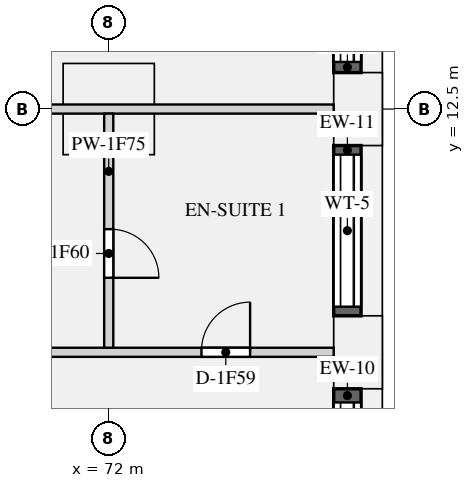
"""IFC4 building model, lengths in metres.
Left out: names, types, materials, properties, quantities, classifications, styles, units other than length and angle.
Written with IfcOpenShell. Run it as: python <this file> out.ifc"""

import sys

from ifc_helpers import new_model, si_unit, direction, frame, frame_2d, origin, origin_2d, place, context, subcontext, project, spatial, rectangle, extrude, element, fill, save


model = new_model("IFC4")
c1 = context("Model", 3, precision=1e-05, world=origin(), true_north=direction((0.0, 1.0)))
c2 = subcontext(c1, "Body", "Model", "MODEL_VIEW")
j1 = project(units=[si_unit("LENGTHUNIT", "METRE"), si_unit("PLANEANGLEUNIT", "RADIAN")], contexts=[c1])
p1 = place(None, origin())
s1 = spatial("IfcSite", under=j1, at=p1, CompositionType="ELEMENT")
p2 = place(p1, origin())
s2 = spatial("IfcBuilding", under=s1, at=p2, CompositionType="ELEMENT")
p3 = place(p2, frame((0.0, 0.0, 60.45)))
s3 = spatial("IfcBuildingStorey", under=s2, at=p3, CompositionType="ELEMENT", Elevation=60.45)
for number, where, z_axis, x_axis in (
    (1, (76.1, 8.5, 0.0), (0.0, 0.0, 1.0), (0.0, 1.0, 0.0)),
    (2, (76.1, 12.5, 0.0), (0.0, 0.0, 1.0), (0.0, 1.0, 0.0)),
):
    element("IfcColumn", number, at=place(p3, frame(where, z_axis=z_axis, x_axis=x_axis)), inside=s3, PredefinedType="USERDEFINED", context=c2, shape_type="SweptSolid", body=[
        extrude(rectangle(XDim=1.2, YDim=0.8, at=origin_2d()), origin(), (0.0, 0.0, 1.0), 3.15),
    ])
p4 = place(p3, frame((72.0, 12.5, 0.0), z_axis=(0.0, 0.0, 1.0), x_axis=(1.0, 0.0, 0.0)))
e3 = element("IfcColumn", 3, at=p4, inside=s3, PredefinedType="COLUMN", context=c2, shape_type="SweptSolid", body=[
    extrude(rectangle(XDim=1.5, YDim=1.5, at=origin_2d()), origin(), (0.0, 0.0, 1.0), 3.15),
])
p5 = place(p3, frame((75.925, 5.7, 0.9), z_axis=(0.0, 0.0, 1.0), x_axis=(0.0, 1.0, 0.0)))
e4 = element("IfcWall", 4, at=p5, inside=s3, PredefinedType="SOLIDWALL", context=c2, shape_type="SweptSolid", body=[
    extrude(rectangle(XDim=2.2, YDim=0.45, at=frame_2d((1.1, 0.0))), origin(), (0.0, 0.0, 1.0), 1.93),
])
p6 = place(p5, frame((0.225, 0.0, 0.15)))
e5 = element("IfcOpeningElement", 5, at=p6, cuts=e4, PredefinedType="OPENING", context=c2, shape_type="SweptSolid", body=[
    extrude(rectangle(XDim=1.75, YDim=1.5, at=frame_2d((0.875, 0.75))), frame((0.0, 0.235, 0.0), z_axis=(0.0, -1.0, 0.0), x_axis=(1.0, 0.0, 0.0)), (0.0, 0.0, 1.0), 0.47),
])
p7 = place(p3, frame((75.925, 9.1, 0.9), z_axis=(0.0, 0.0, 1.0), x_axis=(0.0, 1.0, 0.0)))
e6 = element("IfcWall", 6, at=p7, inside=s3, PredefinedType="SOLIDWALL", context=c2, shape_type="SweptSolid", body=[
    extrude(rectangle(XDim=2.8, YDim=0.45, at=frame_2d((1.4, 0.0))), origin(), (0.0, 0.0, 1.0), 1.93),
])
p8 = place(p7, frame((0.15, 0.0, 0.15)))
e7 = element("IfcOpeningElement", 7, at=p8, cuts=e6, PredefinedType="OPENING", context=c2, shape_type="SweptSolid", body=[
    extrude(rectangle(XDim=2.5, YDim=1.5, at=frame_2d((1.25, 0.75))), frame((0.0, 0.235, 0.0), z_axis=(0.0, -1.0, 0.0), x_axis=(1.0, 0.0, 0.0)), (0.0, 0.0, 1.0), 0.47),
])
p9 = place(p3, frame((75.925, 13.1, 0.9), z_axis=(0.0, 0.0, 1.0), x_axis=(0.0, 1.0, 0.0)))
e8 = element("IfcWall", 8, at=p9, inside=s3, PredefinedType="SOLIDWALL", context=c2, shape_type="SweptSolid", body=[
    extrude(rectangle(XDim=2.6, YDim=0.45, at=frame_2d((1.3, 0.0))), origin(), (0.0, 0.0, 1.0), 1.93),
])
p10 = place(p9, frame((0.175, 0.0, 0.15)))
e9 = element("IfcOpeningElement", 9, at=p10, cuts=e8, PredefinedType="OPENING", context=c2, shape_type="SweptSolid", body=[
    extrude(rectangle(XDim=2.25, YDim=1.5, at=frame_2d((1.125, 0.75))), frame((0.0, 0.235, 0.0), z_axis=(0.0, -1.0, 0.0), x_axis=(1.0, 0.0, 0.0)), (0.0, 0.0, 1.0), 0.47),
])
p11 = place(p3, frame((54.0, 8.5, 0.0), z_axis=(0.0, 0.0, 1.0), x_axis=(1.0, 0.0, 0.0)))
e10 = element("IfcWall", 10, at=p11, inside=s3, PredefinedType="PARTITIONING", context=c2, shape_type="SweptSolid", body=[
    extrude(rectangle(XDim=21.7, YDim=0.15, at=frame_2d((10.85, 0.0))), origin(), (0.0, 0.0, 1.0), 2.83),
])
p12 = place(p11, frame((1.8, 0.0, 0.0)))
e11 = element("IfcOpeningElement", 11, at=p12, cuts=e10, PredefinedType="OPENING", context=c2, shape_type="SweptSolid", body=[
    extrude(rectangle(XDim=0.9, YDim=2.1, at=frame_2d((0.45, 1.05))), frame((0.0, 0.085, 0.0), z_axis=(0.0, -1.0, 0.0), x_axis=(1.0, 0.0, 0.0)), (0.0, 0.0, 1.0), 0.17),
])
p13 = place(p11, frame((6.3, 0.0, 0.0)))
e12 = element("IfcOpeningElement", 12, at=p13, cuts=e10, PredefinedType="OPENING", context=c2, shape_type="SweptSolid", body=[
    extrude(rectangle(XDim=0.9, YDim=2.1, at=frame_2d((0.45, 1.05))), frame((0.0, 0.085, 0.0), z_axis=(0.0, -1.0, 0.0), x_axis=(1.0, 0.0, 0.0)), (0.0, 0.0, 1.0), 0.17),
])
p14 = place(p11, frame((10.8, 0.0, 0.0)))
e13 = element("IfcOpeningElement", 13, at=p14, cuts=e10, PredefinedType="OPENING", context=c2, shape_type="SweptSolid", body=[
    extrude(rectangle(XDim=0.9, YDim=2.1, at=frame_2d((0.45, 1.05))), frame((0.0, 0.085, 0.0), z_axis=(0.0, -1.0, 0.0), x_axis=(1.0, 0.0, 0.0)), (0.0, 0.0, 1.0), 0.17),
])
p15 = place(p11, frame((19.525, 0.0, 0.0)))
e14 = element("IfcOpeningElement", 14, at=p15, cuts=e10, PredefinedType="OPENING", context=c2, shape_type="SweptSolid", body=[
    extrude(rectangle(XDim=0.8, YDim=2.1, at=frame_2d((0.4, 1.05))), frame((0.0, 0.085, 0.0), z_axis=(0.0, -1.0, 0.0), x_axis=(1.0, 0.0, 0.0)), (0.0, 0.0, 1.0), 0.17),
])
p16 = place(p11, frame((15.35, 0.0, 0.0)))
e15 = element("IfcOpeningElement", 15, at=p16, cuts=e10, PredefinedType="OPENING", context=c2, shape_type="SweptSolid", body=[
    extrude(rectangle(XDim=0.8, YDim=2.1, at=frame_2d((0.4, 1.05))), frame((0.0, 0.085, 0.0), z_axis=(0.0, -1.0, 0.0), x_axis=(1.0, 0.0, 0.0)), (0.0, 0.0, 1.0), 0.17),
])
p17 = place(p3, frame((58.425, 12.5, 0.0), z_axis=(0.0, 0.0, 1.0), x_axis=(1.0, 0.0, 0.0)))
e16 = element("IfcWall", 16, at=p17, inside=s3, PredefinedType="PARTITIONING", context=c2, shape_type="SweptSolid", body=[
    extrude(rectangle(XDim=17.275, YDim=0.15, at=frame_2d((8.637, 0.0))), origin(), (0.0, 0.0, 1.0), 2.83),
])
p18 = place(p3, frame((72.0, 8.575, 0.0), z_axis=(0.0, 0.0, 1.0), x_axis=(0.0, 1.0, 0.0)))
e17 = element("IfcWall", 17, at=p18, inside=s3, PredefinedType="PARTITIONING", context=c2, shape_type="SweptSolid", body=[
    extrude(rectangle(XDim=3.85, YDim=0.15, at=frame_2d((1.925, 0.0))), origin(), (0.0, 0.0, 1.0), 2.83),
])
p19 = place(p18, frame((1.15, 0.0, 0.0)))
e18 = element("IfcOpeningElement", 18, at=p19, cuts=e17, PredefinedType="OPENING", context=c2, shape_type="SweptSolid", body=[
    extrude(rectangle(XDim=0.8, YDim=2.1, at=frame_2d((0.4, 1.05))), frame((0.0, 0.085, 0.0), z_axis=(0.0, -1.0, 0.0), x_axis=(1.0, 0.0, 0.0)), (0.0, 0.0, 1.0), 0.17),
])
p20 = place(p6, origin())
e19 = element("IfcWindow", 19, at=p20, inside=s3, PartitioningType="SINGLE_PANEL", PredefinedType="WINDOW", context=c2, shape_type="SweptSolid", body=[
    extrude(rectangle(XDim=1.75, YDim=1.5, at=frame_2d((0.875, 0.75))), frame((0.0, -0.065, 0.0), z_axis=(0.0, -1.0, 0.0), x_axis=(1.0, 0.0, 0.0)), (0.0, 0.0, 1.0), 0.06),
])
fill(e5, e19)
p21 = place(p8, origin())
e20 = element("IfcWindow", 20, at=p21, inside=s3, PartitioningType="SINGLE_PANEL", PredefinedType="WINDOW", context=c2, shape_type="SweptSolid", body=[
    extrude(rectangle(XDim=2.5, YDim=1.5, at=frame_2d((1.25, 0.75))), frame((0.0, -0.065, 0.0), z_axis=(0.0, -1.0, 0.0), x_axis=(1.0, 0.0, 0.0)), (0.0, 0.0, 1.0), 0.06),
])
fill(e7, e20)
p22 = place(p10, origin())
e21 = element("IfcWindow", 21, at=p22, inside=s3, PartitioningType="SINGLE_PANEL", PredefinedType="WINDOW", context=c2, shape_type="SweptSolid", body=[
    extrude(rectangle(XDim=2.25, YDim=1.5, at=frame_2d((1.125, 0.75))), frame((0.0, -0.065, 0.0), z_axis=(0.0, -1.0, 0.0), x_axis=(1.0, 0.0, 0.0)), (0.0, 0.0, 1.0), 0.06),
])
fill(e9, e21)
p23 = place(p15, origin())
e22 = element("IfcDoor", 22, at=p23, inside=s3, OperationType="SINGLE_SWING_RIGHT", PredefinedType="DOOR", context=c2, shape_type="SweptSolid", body=[
    extrude(rectangle(XDim=0.8, YDim=2.1, at=frame_2d((0.4, 1.05))), frame((0.0, 0.025, 0.0), z_axis=(0.0, -1.0, 0.0), x_axis=(1.0, 0.0, 0.0)), (0.0, 0.0, 1.0), 0.05),
])
fill(e14, e22)
p24 = place(p19, frame((0.8, 0.0, 0.0), z_axis=(0.0, 0.0, 1.0), x_axis=(-1.0, 0.0, 0.0)))
e23 = element("IfcDoor", 23, at=p24, inside=s3, OperationType="SINGLE_SWING_RIGHT", PredefinedType="DOOR", context=c2, shape_type="SweptSolid", body=[
    extrude(rectangle(XDim=0.8, YDim=2.1, at=frame_2d((0.4, 1.05))), frame((0.0, 0.025, 0.0), z_axis=(0.0, -1.0, 0.0), x_axis=(1.0, 0.0, 0.0)), (0.0, 0.0, 1.0), 0.05),
])
fill(e18, e23)
save(model, sys.argv[1])
